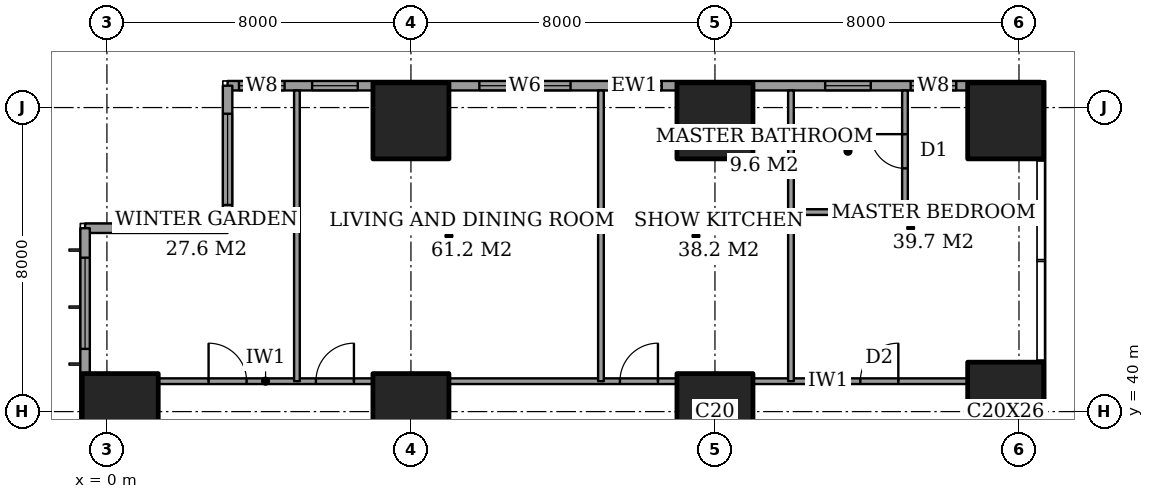
"""IFC4 building model, lengths in metres.
Left out: names, types, materials, properties, quantities, classifications, styles, units other than length and angle.
Written with IfcOpenShell. Run it as: python <this file> out.ifc"""

import sys

from ifc_helpers import new_model, si_unit, direction, frame, frame_2d, origin, origin_2d, place, context, subcontext, project, spatial, rectangle, extrude, element, fill, save


model = new_model("IFC4")
c1 = context("Model", 3, precision=1e-05, world=origin(), true_north=direction((0.0, 1.0)))
c2 = subcontext(c1, "Body", "Model", "MODEL_VIEW")
j1 = project(units=[si_unit("LENGTHUNIT", "METRE"), si_unit("PLANEANGLEUNIT", "RADIAN")], contexts=[c1])
p1 = place(None, origin())
s1 = spatial("IfcSite", under=j1, at=p1, CompositionType="ELEMENT")
p2 = place(p1, origin())
s2 = spatial("IfcBuilding", under=s1, at=p2, CompositionType="ELEMENT")
p3 = place(p2, frame((0.0, 0.0, 44.0)))
s3 = spatial("IfcBuildingStorey", under=s2, at=p3, CompositionType="ELEMENT", Elevation=44.0)
for number, where, z_axis, x_axis in (
    (1, (0.35, 40.0, 0.0), (0.0, 0.0, 1.0), (1.0, 0.0, 0.0)),
    (2, (8.0, 40.0, 0.0), (0.0, 0.0, 1.0), (1.0, 0.0, 0.0)),
    (3, (8.0, 47.65, 0.0), (0.0, 0.0, 1.0), (1.0, 0.0, 0.0)),
    (4, (16.0, 40.0, 0.0), (0.0, 0.0, 1.0), (1.0, 0.0, 0.0)),
    (5, (16.0, 47.65, 0.0), (0.0, 0.0, 1.0), (1.0, 0.0, 0.0)),
):
    element("IfcColumn", number, at=place(p3, frame(where, z_axis=z_axis, x_axis=x_axis)), inside=s3, PredefinedType="COLUMN", context=c2, shape_type="SweptSolid", body=[
        extrude(rectangle(XDim=2.0, YDim=2.0, at=origin_2d()), origin(), (0.0, 0.0, 1.0), 3.6),
    ])
p4 = place(p3, frame((23.65, 40.0, 0.0), z_axis=(0.0, 0.0, 1.0), x_axis=(1.0, 0.0, 0.0)))
e6 = element("IfcColumn", 6, at=p4, inside=s3, PredefinedType="COLUMN", context=c2, shape_type="SweptSolid", body=[
    extrude(rectangle(XDim=2.0, YDim=2.6, at=origin_2d()), origin(), (0.0, 0.0, 1.0), 3.6),
])
p5 = place(p3, frame((23.65, 47.65, 0.0), z_axis=(0.0, 0.0, 1.0), x_axis=(1.0, 0.0, 0.0)))
e7 = element("IfcColumn", 7, at=p5, inside=s3, PredefinedType="COLUMN", context=c2, shape_type="SweptSolid", body=[
    extrude(rectangle(XDim=2.0, YDim=2.0, at=origin_2d()), origin(), (0.0, 0.0, 1.0), 3.6),
])
p6 = place(p3, frame((24.575, 48.575, 0.0), z_axis=(0.0, 0.0, 1.0), x_axis=(-1.0, 0.0, 0.0)))
e8 = element("IfcWall", 8, at=p6, inside=s3, PredefinedType="SOLIDWALL", context=c2, shape_type="SweptSolid", body=[
    extrude(rectangle(XDim=21.4, YDim=0.25, at=frame_2d((10.7, 0.0))), origin(), (0.0, 0.0, 1.0), 3.6),
])
p7 = place(p6, frame((2.225, 0.0, 0.6)))
e9 = element("IfcOpeningElement", 9, at=p7, cuts=e8, PredefinedType="OPENING", context=c2, shape_type="SweptSolid", body=[
    extrude(rectangle(XDim=1.2, YDim=2.0, at=frame_2d((0.6, 1.0))), frame((0.0, 0.135, 0.0), z_axis=(0.0, -1.0, 0.0), x_axis=(1.0, 0.0, 0.0)), (0.0, 0.0, 1.0), 0.27),
])
p8 = place(p6, frame((4.475, 0.0, 0.6)))
e10 = element("IfcOpeningElement", 10, at=p8, cuts=e8, PredefinedType="OPENING", context=c2, shape_type="SweptSolid", body=[
    extrude(rectangle(XDim=1.2, YDim=2.0, at=frame_2d((0.6, 1.0))), frame((0.0, 0.135, 0.0), z_axis=(0.0, -1.0, 0.0), x_axis=(1.0, 0.0, 0.0)), (0.0, 0.0, 1.0), 0.27),
])
p9 = place(p6, frame((9.975, 0.0, 0.6)))
e11 = element("IfcOpeningElement", 11, at=p9, cuts=e8, PredefinedType="OPENING", context=c2, shape_type="SweptSolid", body=[
    extrude(rectangle(XDim=1.2, YDim=2.0, at=frame_2d((0.6, 1.0))), frame((0.0, 0.135, 0.0), z_axis=(0.0, -1.0, 0.0), x_axis=(1.0, 0.0, 0.0)), (0.0, 0.0, 1.0), 0.27),
])
p10 = place(p6, frame((12.375, 0.0, 0.6)))
e12 = element("IfcOpeningElement", 12, at=p10, cuts=e8, PredefinedType="OPENING", context=c2, shape_type="SweptSolid", body=[
    extrude(rectangle(XDim=2.4, YDim=2.0, at=frame_2d((1.2, 1.0))), frame((0.0, 0.135, 0.0), z_axis=(0.0, -1.0, 0.0), x_axis=(1.0, 0.0, 0.0)), (0.0, 0.0, 1.0), 0.27),
])
p11 = place(p6, frame((17.975, 0.0, 0.6)))
e13 = element("IfcOpeningElement", 13, at=p11, cuts=e8, PredefinedType="OPENING", context=c2, shape_type="SweptSolid", body=[
    extrude(rectangle(XDim=1.2, YDim=2.0, at=frame_2d((0.6, 1.0))), frame((0.0, 0.135, 0.0), z_axis=(0.0, -1.0, 0.0), x_axis=(1.0, 0.0, 0.0)), (0.0, 0.0, 1.0), 0.27),
])
p12 = place(p6, frame((19.9, 0.0, 0.6)))
e14 = element("IfcOpeningElement", 14, at=p12, cuts=e8, PredefinedType="OPENING", context=c2, shape_type="SweptSolid", body=[
    extrude(rectangle(XDim=1.2, YDim=2.0, at=frame_2d((0.6, 1.0))), frame((0.0, 0.135, 0.0), z_axis=(0.0, -1.0, 0.0), x_axis=(1.0, 0.0, 0.0)), (0.0, 0.0, 1.0), 0.27),
])
p13 = place(p3, frame((3.175, 48.575, 0.0), z_axis=(0.0, 0.0, 1.0), x_axis=(0.0, -1.0, 0.0)))
e15 = element("IfcWall", 15, at=p13, inside=s3, PredefinedType="SOLIDWALL", context=c2, shape_type="SweptSolid", body=[
    extrude(rectangle(XDim=3.75, YDim=0.25, at=frame_2d((1.875, 0.0))), origin(), (0.0, 0.0, 1.0), 3.6),
])
p14 = place(p13, frame((0.738, 0.0, 0.6)))
e16 = element("IfcOpeningElement", 16, at=p14, cuts=e15, PredefinedType="OPENING", context=c2, shape_type="SweptSolid", body=[
    extrude(rectangle(XDim=2.4, YDim=2.0, at=frame_2d((1.2, 1.0))), frame((0.0, 0.135, 0.0), z_axis=(0.0, -1.0, 0.0), x_axis=(1.0, 0.0, 0.0)), (0.0, 0.0, 1.0), 0.27),
])
p15 = place(p3, frame((3.175, 44.825, 0.0), z_axis=(0.0, 0.0, 1.0), x_axis=(-1.0, 0.0, 0.0)))
e17 = element("IfcWall", 17, at=p15, inside=s3, PredefinedType="SOLIDWALL", context=c2, shape_type="SweptSolid", body=[
    extrude(rectangle(XDim=3.75, YDim=0.25, at=frame_2d((1.875, 0.0))), origin(), (0.0, 0.0, 1.0), 3.6),
])
p16 = place(p15, frame((0.613, 0.0, 0.6)))
e18 = element("IfcOpeningElement", 18, at=p16, cuts=e17, PredefinedType="OPENING", context=c2, shape_type="SweptSolid", body=[
    extrude(rectangle(XDim=2.4, YDim=2.0, at=frame_2d((1.2, 1.0))), frame((0.0, 0.135, 0.0), z_axis=(0.0, -1.0, 0.0), x_axis=(1.0, 0.0, 0.0)), (0.0, 0.0, 1.0), 0.27),
])
p17 = place(p3, frame((-0.575, 44.825, 0.0), z_axis=(0.0, 0.0, 1.0), x_axis=(0.0, -1.0, 0.0)))
e19 = element("IfcWall", 19, at=p17, inside=s3, PredefinedType="SOLIDWALL", context=c2, shape_type="SweptSolid", body=[
    extrude(rectangle(XDim=41.65, YDim=0.25, at=frame_2d((20.825, 0.0))), origin(), (0.0, 0.0, 1.0), 3.6),
])
p18 = place(p17, frame((0.775, 0.0, 0.6)))
e20 = element("IfcOpeningElement", 20, at=p18, cuts=e19, PredefinedType="OPENING", context=c2, shape_type="SweptSolid", body=[
    extrude(rectangle(XDim=2.4, YDim=2.0, at=frame_2d((1.2, 1.0))), frame((0.0, 0.135, 0.0), z_axis=(0.0, -1.0, 0.0), x_axis=(1.0, 0.0, 0.0)), (0.0, 0.0, 1.0), 0.27),
])
p19 = place(p17, frame((6.1, 0.0, 0.6)))
e21 = element("IfcOpeningElement", 21, at=p19, cuts=e19, PredefinedType="OPENING", context=c2, shape_type="SweptSolid", body=[
    extrude(rectangle(XDim=1.2, YDim=2.0, at=frame_2d((0.6, 1.0))), frame((0.0, 0.135, 0.0), z_axis=(0.0, -1.0, 0.0), x_axis=(1.0, 0.0, 0.0)), (0.0, 0.0, 1.0), 0.27),
])
p20 = place(p17, frame((8.425, 0.0, 0.6)))
e22 = element("IfcOpeningElement", 22, at=p20, cuts=e19, PredefinedType="OPENING", context=c2, shape_type="SweptSolid", body=[
    extrude(rectangle(XDim=2.4, YDim=2.0, at=frame_2d((1.2, 1.0))), frame((0.0, 0.135, 0.0), z_axis=(0.0, -1.0, 0.0), x_axis=(1.0, 0.0, 0.0)), (0.0, 0.0, 1.0), 0.27),
])
p21 = place(p17, frame((15.625, 0.0, 0.6)))
e23 = element("IfcOpeningElement", 23, at=p21, cuts=e19, PredefinedType="OPENING", context=c2, shape_type="SweptSolid", body=[
    extrude(rectangle(XDim=2.4, YDim=2.0, at=frame_2d((1.2, 1.0))), frame((0.0, 0.135, 0.0), z_axis=(0.0, -1.0, 0.0), x_axis=(1.0, 0.0, 0.0)), (0.0, 0.0, 1.0), 0.27),
])
p22 = place(p17, frame((23.625, 0.0, 0.6)))
e24 = element("IfcOpeningElement", 24, at=p22, cuts=e19, PredefinedType="OPENING", context=c2, shape_type="SweptSolid", body=[
    extrude(rectangle(XDim=2.4, YDim=2.0, at=frame_2d((1.2, 1.0))), frame((0.0, 0.135, 0.0), z_axis=(0.0, -1.0, 0.0), x_axis=(1.0, 0.0, 0.0)), (0.0, 0.0, 1.0), 0.27),
])
p23 = place(p17, frame((30.825, 0.0, 0.6)))
e25 = element("IfcOpeningElement", 25, at=p23, cuts=e19, PredefinedType="OPENING", context=c2, shape_type="SweptSolid", body=[
    extrude(rectangle(XDim=2.4, YDim=2.0, at=frame_2d((1.2, 1.0))), frame((0.0, 0.135, 0.0), z_axis=(0.0, -1.0, 0.0), x_axis=(1.0, 0.0, 0.0)), (0.0, 0.0, 1.0), 0.27),
])
p24 = place(p17, frame((34.5, 0.0, 0.6)))
e26 = element("IfcOpeningElement", 26, at=p24, cuts=e19, PredefinedType="OPENING", context=c2, shape_type="SweptSolid", body=[
    extrude(rectangle(XDim=1.2, YDim=2.0, at=frame_2d((0.6, 1.0))), frame((0.0, 0.135, 0.0), z_axis=(0.0, -1.0, 0.0), x_axis=(1.0, 0.0, 0.0)), (0.0, 0.0, 1.0), 0.27),
])
p25 = place(p17, frame((38.475, 0.0, 0.6)))
e27 = element("IfcOpeningElement", 27, at=p25, cuts=e19, PredefinedType="OPENING", context=c2, shape_type="SweptSolid", body=[
    extrude(rectangle(XDim=2.4, YDim=2.0, at=frame_2d((1.2, 1.0))), frame((0.0, 0.135, 0.0), z_axis=(0.0, -1.0, 0.0), x_axis=(1.0, 0.0, 0.0)), (0.0, 0.0, 1.0), 0.27),
])
p26 = place(p3, frame((1.35, 40.8, 0.0), z_axis=(0.0, 0.0, 1.0), x_axis=(1.0, 0.0, 0.0)))
e28 = element("IfcWall", 28, at=p26, inside=s3, PredefinedType="PARTITIONING", context=c2, shape_type="SweptSolid", body=[
    extrude(rectangle(XDim=5.65, YDim=0.15, at=frame_2d((2.825, 0.0))), origin(), (0.0, 0.0, 1.0), 3.35),
])
p27 = place(p26, frame((1.325, 0.0, 0.0)))
e29 = element("IfcOpeningElement", 29, at=p27, cuts=e28, PredefinedType="OPENING", context=c2, shape_type="SweptSolid", body=[
    extrude(rectangle(XDim=1.0, YDim=2.1, at=frame_2d((0.5, 1.05))), frame((0.0, 0.085, 0.0), z_axis=(0.0, -1.0, 0.0), x_axis=(1.0, 0.0, 0.0)), (0.0, 0.0, 1.0), 0.17),
])
p28 = place(p26, frame((4.15, 0.0, 0.0)))
e30 = element("IfcOpeningElement", 30, at=p28, cuts=e28, PredefinedType="OPENING", context=c2, shape_type="SweptSolid", body=[
    extrude(rectangle(XDim=1.0, YDim=2.1, at=frame_2d((0.5, 1.05))), frame((0.0, 0.085, 0.0), z_axis=(0.0, -1.0, 0.0), x_axis=(1.0, 0.0, 0.0)), (0.0, 0.0, 1.0), 0.17),
])
p29 = place(p3, frame((9.0, 40.8, 0.0), z_axis=(0.0, 0.0, 1.0), x_axis=(1.0, 0.0, 0.0)))
e31 = element("IfcWall", 31, at=p29, inside=s3, PredefinedType="PARTITIONING", context=c2, shape_type="SweptSolid", body=[
    extrude(rectangle(XDim=6.0, YDim=0.15, at=frame_2d((3.0, 0.0))), origin(), (0.0, 0.0, 1.0), 3.35),
])
p30 = place(p29, frame((4.5, 0.0, 0.0)))
e32 = element("IfcOpeningElement", 32, at=p30, cuts=e31, PredefinedType="OPENING", context=c2, shape_type="SweptSolid", body=[
    extrude(rectangle(XDim=1.0, YDim=2.1, at=frame_2d((0.5, 1.05))), frame((0.0, 0.085, 0.0), z_axis=(0.0, -1.0, 0.0), x_axis=(1.0, 0.0, 0.0)), (0.0, 0.0, 1.0), 0.17),
])
p31 = place(p3, frame((17.0, 40.8, 0.0), z_axis=(0.0, 0.0, 1.0), x_axis=(1.0, 0.0, 0.0)))
e33 = element("IfcWall", 33, at=p31, inside=s3, PredefinedType="PARTITIONING", context=c2, shape_type="SweptSolid", body=[
    extrude(rectangle(XDim=5.65, YDim=0.15, at=frame_2d((2.825, 0.0))), origin(), (0.0, 0.0, 1.0), 3.35),
])
p32 = place(p31, frame((2.825, 0.0, 0.0)))
e34 = element("IfcOpeningElement", 34, at=p32, cuts=e33, PredefinedType="OPENING", context=c2, shape_type="SweptSolid", body=[
    extrude(rectangle(XDim=1.0, YDim=2.1, at=frame_2d((0.5, 1.05))), frame((0.0, 0.085, 0.0), z_axis=(0.0, -1.0, 0.0), x_axis=(1.0, 0.0, 0.0)), (0.0, 0.0, 1.0), 0.17),
])
p33 = place(p3, frame((18.0, 45.25, 0.0), z_axis=(0.0, 0.0, 1.0), x_axis=(1.0, 0.0, 0.0)))
e35 = element("IfcWall", 35, at=p33, inside=s3, PredefinedType="PARTITIONING", context=c2, shape_type="SweptSolid", body=[
    extrude(rectangle(XDim=3.0, YDim=0.15, at=frame_2d((1.5, 0.0))), origin(), (0.0, 0.0, 1.0), 3.35),
])
for number, where, z_axis, x_axis in (
    (36, (5.0, 40.8, 0.0), (0.0, 0.0, 1.0), (0.0, 1.0, 0.0)),
    (37, (13.0, 40.8, 0.0), (0.0, 0.0, 1.0), (0.0, 1.0, 0.0)),
    (38, (18.0, 40.8, 0.0), (0.0, 0.0, 1.0), (0.0, 1.0, 0.0)),
):
    element("IfcWall", number, at=place(p3, frame(where, z_axis=z_axis, x_axis=x_axis)), inside=s3, PredefinedType="PARTITIONING", context=c2, shape_type="SweptSolid", body=[
        extrude(rectangle(XDim=7.65, YDim=0.15, at=frame_2d((3.825, 0.0))), origin(), (0.0, 0.0, 1.0), 3.35),
    ])
p34 = place(p3, frame((21.0, 45.25, 0.0), z_axis=(0.0, 0.0, 1.0), x_axis=(0.0, 1.0, 0.0)))
e39 = element("IfcWall", 39, at=p34, inside=s3, PredefinedType="PARTITIONING", context=c2, shape_type="SweptSolid", body=[
    extrude(rectangle(XDim=3.2, YDim=0.15, at=frame_2d((1.6, 0.0))), origin(), (0.0, 0.0, 1.0), 3.35),
])
p35 = place(p34, frame((1.15, 0.0, 0.0)))
e40 = element("IfcOpeningElement", 40, at=p35, cuts=e39, PredefinedType="OPENING", context=c2, shape_type="SweptSolid", body=[
    extrude(rectangle(XDim=0.9, YDim=2.1, at=frame_2d((0.45, 1.05))), frame((0.0, 0.085, 0.0), z_axis=(0.0, -1.0, 0.0), x_axis=(1.0, 0.0, 0.0)), (0.0, 0.0, 1.0), 0.17),
])
p36 = place(p7, origin())
e41 = element("IfcWindow", 41, at=p36, inside=s3, PartitioningType="SINGLE_PANEL", PredefinedType="WINDOW", context=c2, shape_type="SweptSolid", body=[
    extrude(rectangle(XDim=1.2, YDim=2.0, at=frame_2d((0.6, 1.0))), frame((0.0, 0.03, 0.0), z_axis=(0.0, -1.0, 0.0), x_axis=(1.0, 0.0, 0.0)), (0.0, 0.0, 1.0), 0.06),
])
fill(e9, e41)
p37 = place(p8, origin())
e42 = element("IfcWindow", 42, at=p37, inside=s3, PartitioningType="SINGLE_PANEL", PredefinedType="WINDOW", context=c2, shape_type="SweptSolid", body=[
    extrude(rectangle(XDim=1.2, YDim=2.0, at=frame_2d((0.6, 1.0))), frame((0.0, 0.03, 0.0), z_axis=(0.0, -1.0, 0.0), x_axis=(1.0, 0.0, 0.0)), (0.0, 0.0, 1.0), 0.06),
])
fill(e10, e42)
p38 = place(p9, origin())
e43 = element("IfcWindow", 43, at=p38, inside=s3, PartitioningType="SINGLE_PANEL", PredefinedType="WINDOW", context=c2, shape_type="SweptSolid", body=[
    extrude(rectangle(XDim=1.2, YDim=2.0, at=frame_2d((0.6, 1.0))), frame((0.0, 0.03, 0.0), z_axis=(0.0, -1.0, 0.0), x_axis=(1.0, 0.0, 0.0)), (0.0, 0.0, 1.0), 0.06),
])
fill(e11, e43)
p39 = place(p10, origin())
e44 = element("IfcWindow", 44, at=p39, inside=s3, PartitioningType="SINGLE_PANEL", PredefinedType="WINDOW", context=c2, shape_type="SweptSolid", body=[
    extrude(rectangle(XDim=2.4, YDim=2.0, at=frame_2d((1.2, 1.0))), frame((0.0, 0.03, 0.0), z_axis=(0.0, -1.0, 0.0), x_axis=(1.0, 0.0, 0.0)), (0.0, 0.0, 1.0), 0.06),
])
fill(e12, e44)
p40 = place(p11, origin())
e45 = element("IfcWindow", 45, at=p40, inside=s3, PartitioningType="SINGLE_PANEL", PredefinedType="WINDOW", context=c2, shape_type="SweptSolid", body=[
    extrude(rectangle(XDim=1.2, YDim=2.0, at=frame_2d((0.6, 1.0))), frame((0.0, 0.03, 0.0), z_axis=(0.0, -1.0, 0.0), x_axis=(1.0, 0.0, 0.0)), (0.0, 0.0, 1.0), 0.06),
])
fill(e13, e45)
p41 = place(p12, origin())
e46 = element("IfcWindow", 46, at=p41, inside=s3, PartitioningType="SINGLE_PANEL", PredefinedType="WINDOW", context=c2, shape_type="SweptSolid", body=[
    extrude(rectangle(XDim=1.2, YDim=2.0, at=frame_2d((0.6, 1.0))), frame((0.0, 0.03, 0.0), z_axis=(0.0, -1.0, 0.0), x_axis=(1.0, 0.0, 0.0)), (0.0, 0.0, 1.0), 0.06),
])
fill(e14, e46)
p42 = place(p14, origin())
e47 = element("IfcWindow", 47, at=p42, inside=s3, PartitioningType="SINGLE_PANEL", PredefinedType="WINDOW", context=c2, shape_type="SweptSolid", body=[
    extrude(rectangle(XDim=2.4, YDim=2.0, at=frame_2d((1.2, 1.0))), frame((0.0, 0.03, 0.0), z_axis=(0.0, -1.0, 0.0), x_axis=(1.0, 0.0, 0.0)), (0.0, 0.0, 1.0), 0.06),
])
fill(e16, e47)
p43 = place(p16, origin())
e48 = element("IfcWindow", 48, at=p43, inside=s3, PartitioningType="SINGLE_PANEL", PredefinedType="WINDOW", context=c2, shape_type="SweptSolid", body=[
    extrude(rectangle(XDim=2.4, YDim=2.0, at=frame_2d((1.2, 1.0))), frame((0.0, 0.03, 0.0), z_axis=(0.0, -1.0, 0.0), x_axis=(1.0, 0.0, 0.0)), (0.0, 0.0, 1.0), 0.06),
])
fill(e18, e48)
p44 = place(p18, origin())
e49 = element("IfcWindow", 49, at=p44, inside=s3, PartitioningType="SINGLE_PANEL", PredefinedType="WINDOW", context=c2, shape_type="SweptSolid", body=[
    extrude(rectangle(XDim=2.4, YDim=2.0, at=frame_2d((1.2, 1.0))), frame((0.0, 0.03, 0.0), z_axis=(0.0, -1.0, 0.0), x_axis=(1.0, 0.0, 0.0)), (0.0, 0.0, 1.0), 0.06),
])
fill(e20, e49)
p45 = place(p27, origin())
e50 = element("IfcDoor", 50, at=p45, inside=s3, OperationType="SINGLE_SWING_RIGHT", PredefinedType="DOOR", context=c2, shape_type="SweptSolid", body=[
    extrude(rectangle(XDim=1.0, YDim=2.1, at=frame_2d((0.5, 1.05))), frame((0.0, 0.025, 0.0), z_axis=(0.0, -1.0, 0.0), x_axis=(1.0, 0.0, 0.0)), (0.0, 0.0, 1.0), 0.05),
])
fill(e29, e50)
p46 = place(p28, origin())
e51 = element("IfcDoor", 51, at=p46, inside=s3, OperationType="SINGLE_SWING_LEFT", PredefinedType="DOOR", context=c2, shape_type="SweptSolid", body=[
    extrude(rectangle(XDim=1.0, YDim=2.1, at=frame_2d((0.5, 1.05))), frame((0.0, 0.025, 0.0), z_axis=(0.0, -1.0, 0.0), x_axis=(1.0, 0.0, 0.0)), (0.0, 0.0, 1.0), 0.05),
])
fill(e30, e51)
p47 = place(p30, origin())
e52 = element("IfcDoor", 52, at=p47, inside=s3, OperationType="SINGLE_SWING_LEFT", PredefinedType="DOOR", context=c2, shape_type="SweptSolid", body=[
    extrude(rectangle(XDim=1.0, YDim=2.1, at=frame_2d((0.5, 1.05))), frame((0.0, 0.025, 0.0), z_axis=(0.0, -1.0, 0.0), x_axis=(1.0, 0.0, 0.0)), (0.0, 0.0, 1.0), 0.05),
])
fill(e32, e52)
p48 = place(p35, origin())
e53 = element("IfcDoor", 53, at=p48, inside=s3, OperationType="SINGLE_SWING_LEFT", PredefinedType="DOOR", context=c2, shape_type="SweptSolid", body=[
    extrude(rectangle(XDim=0.9, YDim=2.1, at=frame_2d((0.45, 1.05))), frame((0.0, 0.025, 0.0), z_axis=(0.0, -1.0, 0.0), x_axis=(1.0, 0.0, 0.0)), (0.0, 0.0, 1.0), 0.05),
])
fill(e40, e53)
p49 = place(p32, origin())
e54 = element("IfcDoor", 54, at=p49, inside=s3, OperationType="SINGLE_SWING_LEFT", PredefinedType="DOOR", context=c2, shape_type="SweptSolid", body=[
    extrude(rectangle(XDim=1.0, YDim=2.1, at=frame_2d((0.5, 1.05))), frame((0.0, 0.025, 0.0), z_axis=(0.0, -1.0, 0.0), x_axis=(1.0, 0.0, 0.0)), (0.0, 0.0, 1.0), 0.05),
])
fill(e34, e54)
save(model, sys.argv[1])
